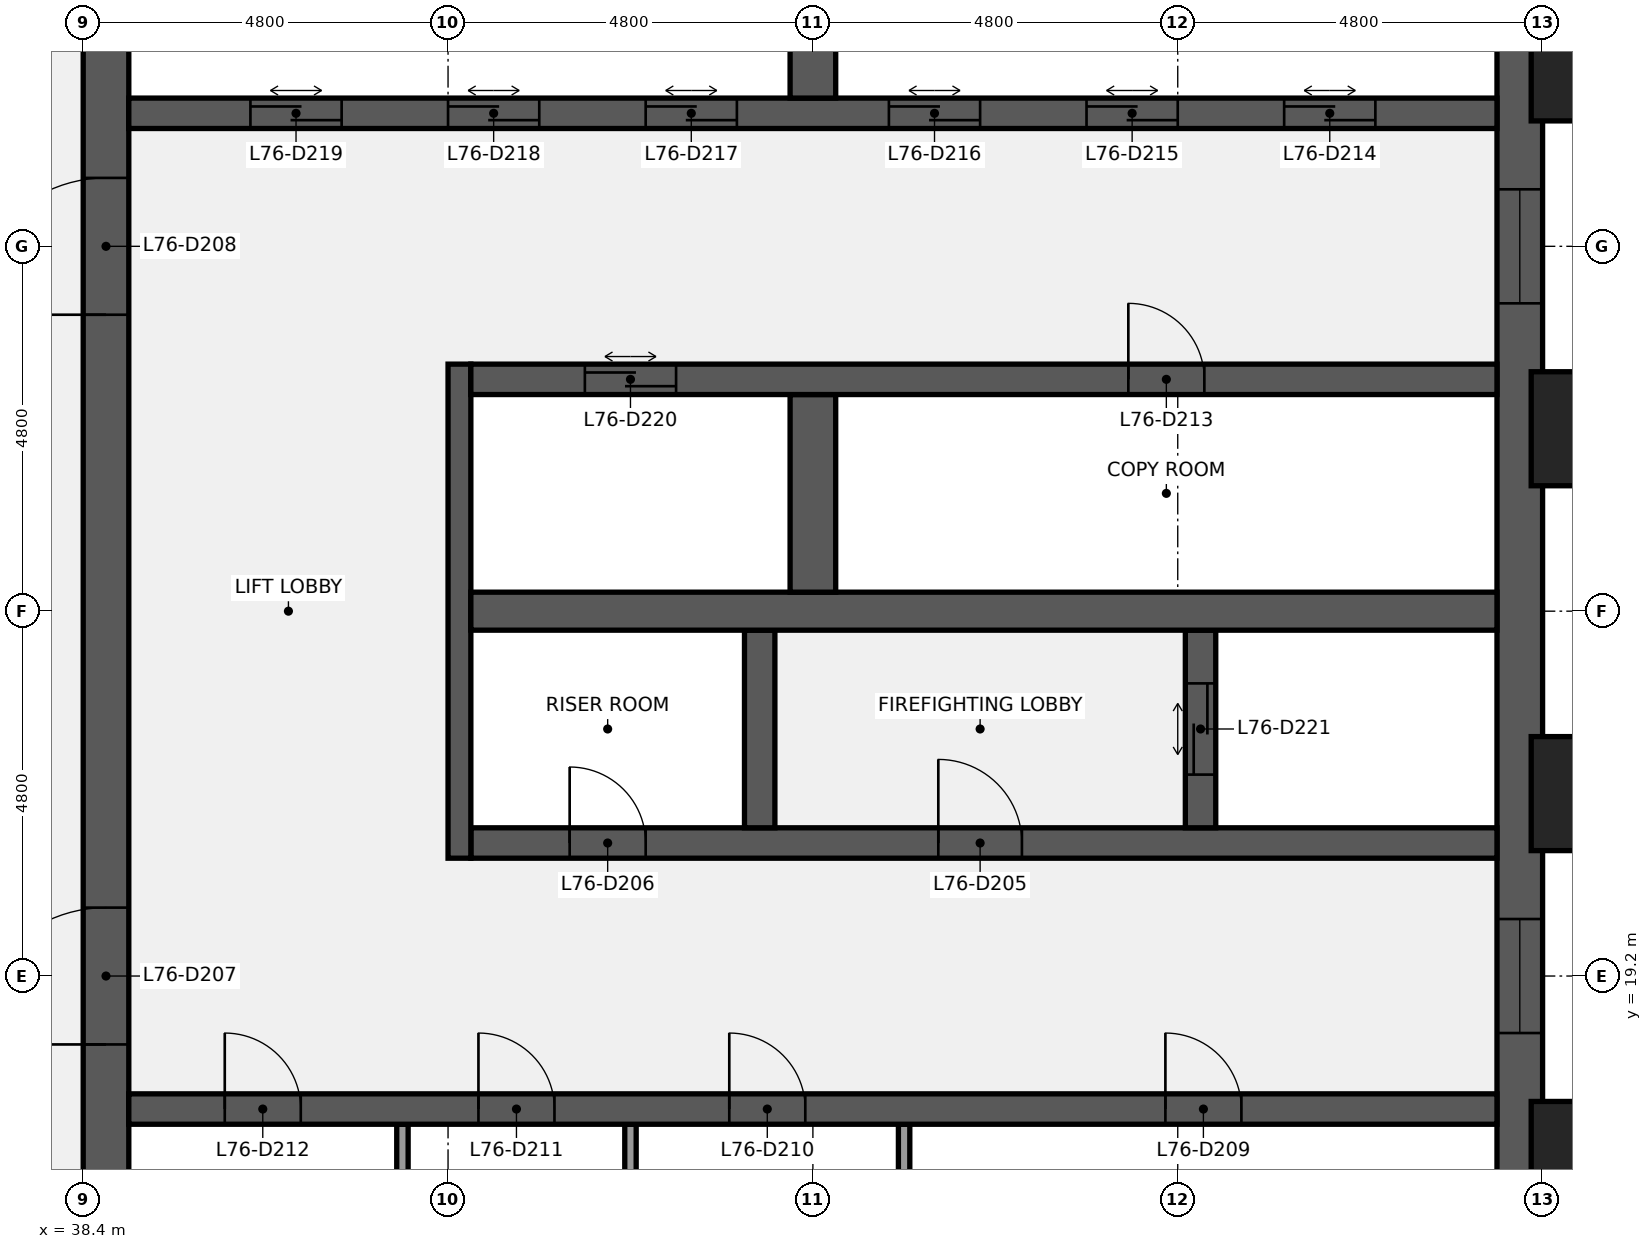
"""IFC4 building model, lengths in metres.
Left out: names, types, materials, properties, quantities, classifications, styles, units other than length and angle.
Written with IfcOpenShell. Run it as: python <this file> out.ifc"""

import sys

from ifc_helpers import new_model, si_unit, direction, frame, frame_2d, origin, origin_2d, place, context, subcontext, project, spatial, rectangle, extrude, element, fill, save


model = new_model("IFC4")
c1 = context("Model", 3, precision=1e-05, world=origin(), true_north=direction((0.0, 1.0)))
c2 = subcontext(c1, "Body", "Model", "MODEL_VIEW")
j1 = project(units=[si_unit("LENGTHUNIT", "METRE"), si_unit("PLANEANGLEUNIT", "RADIAN")], contexts=[c1])
p1 = place(None, origin())
s1 = spatial("IfcSite", under=j1, at=p1, CompositionType="ELEMENT")
p2 = place(p1, origin())
s2 = spatial("IfcBuilding", under=s1, at=p2, CompositionType="ELEMENT")
p3 = place(p2, frame((0.0, 0.0, 342.3)))
s3 = spatial("IfcBuildingStorey", under=s2, at=p3, CompositionType="ELEMENT", Elevation=342.3)
p4 = place(p3, frame((57.3, 38.4, 0.0), z_axis=(0.0, 0.0, 1.0), x_axis=(0.0, -1.0, 0.0)))
e1 = element("IfcWall", 1, at=p4, inside=s3, PredefinedType="SHEAR", context=c2, shape_type="SweptSolid", body=[
    extrude(rectangle(XDim=28.8, YDim=0.6, at=frame_2d((14.4, 0.0))), origin(), (0.0, 0.0, 1.0), 3.84),
])
p5 = place(p4, frame((18.45, 0.0, 0.9)))
e2 = element("IfcOpeningElement", 2, at=p5, cuts=e1, PredefinedType="OPENING", context=c2, shape_type="SweptSolid", body=[
    extrude(rectangle(XDim=1.5, YDim=1.5, at=frame_2d((0.75, 0.75))), frame((0.0, 0.31, 0.0), z_axis=(0.0, -1.0, 0.0), x_axis=(1.0, 0.0, 0.0)), (0.0, 0.0, 1.0), 0.62),
])
p6 = place(p4, frame((8.85, 0.0, 0.9)))
e3 = element("IfcOpeningElement", 3, at=p6, cuts=e1, PredefinedType="OPENING", context=c2, shape_type="SweptSolid", body=[
    extrude(rectangle(XDim=1.5, YDim=1.5, at=frame_2d((0.75, 0.75))), frame((0.0, 0.31, 0.0), z_axis=(0.0, -1.0, 0.0), x_axis=(1.0, 0.0, 0.0)), (0.0, 0.0, 1.0), 0.62),
])
p7 = place(p3, frame((38.7, 9.6, 0.0), z_axis=(0.0, 0.0, 1.0), x_axis=(0.0, 1.0, 0.0)))
e4 = element("IfcWall", 4, at=p7, inside=s3, PredefinedType="SHEAR", context=c2, shape_type="SweptSolid", body=[
    extrude(rectangle(XDim=28.8, YDim=0.6, at=frame_2d((14.4, 0.0))), origin(), (0.0, 0.0, 1.0), 3.84),
])
p8 = place(p7, frame((8.7, 0.0, 0.0)))
e5 = element("IfcOpeningElement", 5, at=p8, cuts=e4, PredefinedType="OPENING", context=c2, shape_type="SweptSolid", body=[
    extrude(rectangle(XDim=1.8, YDim=2.1, at=frame_2d((0.9, 1.05))), frame((0.0, 0.31, 0.0), z_axis=(0.0, -1.0, 0.0), x_axis=(1.0, 0.0, 0.0)), (0.0, 0.0, 1.0), 0.62),
])
p9 = place(p7, frame((18.3, 0.0, 0.0)))
e6 = element("IfcOpeningElement", 6, at=p9, cuts=e4, PredefinedType="OPENING", context=c2, shape_type="SweptSolid", body=[
    extrude(rectangle(XDim=1.8, YDim=2.1, at=frame_2d((0.9, 1.05))), frame((0.0, 0.31, 0.0), z_axis=(0.0, -1.0, 0.0), x_axis=(1.0, 0.0, 0.0)), (0.0, 0.0, 1.0), 0.62),
])
for number, where, z_axis, x_axis in (
    (7, (49.2, 14.65, 0.0), (0.0, 0.0, 1.0), (0.0, 1.0, 0.0)),
    (8, (45.6, 14.65, 0.0), (0.0, 0.0, 1.0), (0.0, 1.0, 0.0)),
    (9, (42.6, 14.65, 0.0), (0.0, 0.0, 1.0), (0.0, 1.0, 0.0)),
):
    element("IfcWall", number, at=place(p3, frame(where, z_axis=z_axis, x_axis=x_axis)), inside=s3, PredefinedType="PARTITIONING", context=c2, shape_type="SweptSolid", body=[
        extrude(rectangle(XDim=2.6, YDim=0.15, at=frame_2d((1.3, 0.0))), origin(), (0.0, 0.0, 1.0), 3.84),
    ])
p10 = place(p3, frame((39.0, 17.45, 0.0), z_axis=(0.0, 0.0, 1.0), x_axis=(1.0, 0.0, 0.0)))
e10 = element("IfcWall", 10, at=p10, inside=s3, PredefinedType="SHEAR", context=c2, shape_type="SweptSolid", body=[
    extrude(rectangle(XDim=18.0, YDim=0.4, at=frame_2d((9.0, 0.0))), origin(), (0.0, 0.0, 1.0), 3.84),
])
p11 = place(p10, frame((13.637, 0.0, 0.0)))
e11 = element("IfcOpeningElement", 11, at=p11, cuts=e10, PredefinedType="OPENING", context=c2, shape_type="SweptSolid", body=[
    extrude(rectangle(XDim=1.0, YDim=2.1, at=frame_2d((0.5, 1.05))), frame((0.0, 0.21, 0.0), z_axis=(0.0, -1.0, 0.0), x_axis=(1.0, 0.0, 0.0)), (0.0, 0.0, 1.0), 0.42),
])
p12 = place(p10, frame((7.9, 0.0, 0.0)))
e12 = element("IfcOpeningElement", 12, at=p12, cuts=e10, PredefinedType="OPENING", context=c2, shape_type="SweptSolid", body=[
    extrude(rectangle(XDim=1.0, YDim=2.1, at=frame_2d((0.5, 1.05))), frame((0.0, 0.21, 0.0), z_axis=(0.0, -1.0, 0.0), x_axis=(1.0, 0.0, 0.0)), (0.0, 0.0, 1.0), 0.42),
])
p13 = place(p10, frame((4.6, 0.0, 0.0)))
e13 = element("IfcOpeningElement", 13, at=p13, cuts=e10, PredefinedType="OPENING", context=c2, shape_type="SweptSolid", body=[
    extrude(rectangle(XDim=1.0, YDim=2.1, at=frame_2d((0.5, 1.05))), frame((0.0, 0.21, 0.0), z_axis=(0.0, -1.0, 0.0), x_axis=(1.0, 0.0, 0.0)), (0.0, 0.0, 1.0), 0.42),
])
p14 = place(p10, frame((1.262, 0.0, 0.0)))
e14 = element("IfcOpeningElement", 14, at=p14, cuts=e10, PredefinedType="OPENING", context=c2, shape_type="SweptSolid", body=[
    extrude(rectangle(XDim=1.0, YDim=2.1, at=frame_2d((0.5, 1.05))), frame((0.0, 0.21, 0.0), z_axis=(0.0, -1.0, 0.0), x_axis=(1.0, 0.0, 0.0)), (0.0, 0.0, 1.0), 0.42),
])
p15 = place(p3, frame((43.5, 20.95, 0.0), z_axis=(0.0, 0.0, 1.0), x_axis=(1.0, 0.0, 0.0)))
e15 = element("IfcWall", 15, at=p15, inside=s3, PredefinedType="SHEAR", context=c2, shape_type="SweptSolid", body=[
    extrude(rectangle(XDim=13.5, YDim=0.4, at=frame_2d((6.75, 0.0))), origin(), (0.0, 0.0, 1.0), 3.84),
])
p16 = place(p15, frame((6.15, 0.0, 0.0)))
e16 = element("IfcOpeningElement", 16, at=p16, cuts=e15, PredefinedType="OPENING", context=c2, shape_type="SweptSolid", body=[
    extrude(rectangle(XDim=1.1, YDim=2.1, at=frame_2d((0.55, 1.05))), frame((0.0, 0.21, 0.0), z_axis=(0.0, -1.0, 0.0), x_axis=(1.0, 0.0, 0.0)), (0.0, 0.0, 1.0), 0.42),
])
p17 = place(p15, frame((1.3, 0.0, 0.0)))
e17 = element("IfcOpeningElement", 17, at=p17, cuts=e15, PredefinedType="OPENING", context=c2, shape_type="SweptSolid", body=[
    extrude(rectangle(XDim=1.0, YDim=2.1, at=frame_2d((0.5, 1.05))), frame((0.0, 0.21, 0.0), z_axis=(0.0, -1.0, 0.0), x_axis=(1.0, 0.0, 0.0)), (0.0, 0.0, 1.0), 0.42),
])
p18 = place(p3, frame((43.35, 20.75, 0.0), z_axis=(0.0, 0.0, 1.0), x_axis=(0.0, 1.0, 0.0)))
e18 = element("IfcWall", 18, at=p18, inside=s3, PredefinedType="SHEAR", context=c2, shape_type="SweptSolid", body=[
    extrude(rectangle(XDim=6.5, YDim=0.3, at=frame_2d((3.25, 0.0))), origin(), (0.0, 0.0, 1.0), 3.84),
])
p19 = place(p3, frame((53.1, 21.15, 0.0), z_axis=(0.0, 0.0, 1.0), x_axis=(0.0, 1.0, 0.0)))
e19 = element("IfcWall", 19, at=p19, inside=s3, PredefinedType="SHEAR", context=c2, shape_type="SweptSolid", body=[
    extrude(rectangle(XDim=2.6, YDim=0.4, at=frame_2d((1.3, 0.0))), origin(), (0.0, 0.0, 1.0), 3.84),
])
p20 = place(p19, frame((0.7, 0.0, 0.0)))
e20 = element("IfcOpeningElement", 20, at=p20, cuts=e19, PredefinedType="OPENING", context=c2, shape_type="SweptSolid", body=[
    extrude(rectangle(XDim=1.2, YDim=2.1, at=frame_2d((0.6, 1.05))), frame((0.0, 0.21, 0.0), z_axis=(0.0, -1.0, 0.0), x_axis=(1.0, 0.0, 0.0)), (0.0, 0.0, 1.0), 0.42),
])
p21 = place(p3, frame((47.3, 21.15, 0.0), z_axis=(0.0, 0.0, 1.0), x_axis=(0.0, 1.0, 0.0)))
e21 = element("IfcWall", 21, at=p21, inside=s3, PredefinedType="SHEAR", context=c2, shape_type="SweptSolid", body=[
    extrude(rectangle(XDim=2.6, YDim=0.4, at=frame_2d((1.3, 0.0))), origin(), (0.0, 0.0, 1.0), 3.84),
])
p22 = place(p3, frame((43.5, 24.0, 0.0), z_axis=(0.0, 0.0, 1.0), x_axis=(1.0, 0.0, 0.0)))
e22 = element("IfcWall", 22, at=p22, inside=s3, PredefinedType="SHEAR", context=c2, shape_type="SweptSolid", body=[
    extrude(rectangle(XDim=13.5, YDim=0.5, at=frame_2d((6.75, 0.0))), origin(), (0.0, 0.0, 1.0), 3.84),
])
p23 = place(p3, frame((48.0, 24.25, 0.0), z_axis=(0.0, 0.0, 1.0), x_axis=(0.0, 1.0, 0.0)))
e23 = element("IfcWall", 23, at=p23, inside=s3, PredefinedType="SHEAR", context=c2, shape_type="SweptSolid", body=[
    extrude(rectangle(XDim=2.6, YDim=0.6, at=frame_2d((1.3, 0.0))), origin(), (0.0, 0.0, 1.0), 3.84),
])
p24 = place(p3, frame((43.5, 27.05, 0.0), z_axis=(0.0, 0.0, 1.0), x_axis=(1.0, 0.0, 0.0)))
e24 = element("IfcWall", 24, at=p24, inside=s3, PredefinedType="SHEAR", context=c2, shape_type="SweptSolid", body=[
    extrude(rectangle(XDim=13.5, YDim=0.4, at=frame_2d((6.75, 0.0))), origin(), (0.0, 0.0, 1.0), 3.84),
])
p25 = place(p24, frame((8.65, 0.0, 0.0)))
e25 = element("IfcOpeningElement", 25, at=p25, cuts=e24, PredefinedType="OPENING", context=c2, shape_type="SweptSolid", body=[
    extrude(rectangle(XDim=1.0, YDim=2.1, at=frame_2d((0.5, 1.05))), frame((0.0, 0.21, 0.0), z_axis=(0.0, -1.0, 0.0), x_axis=(1.0, 0.0, 0.0)), (0.0, 0.0, 1.0), 0.42),
])
p26 = place(p24, frame((1.5, 0.0, 0.0)))
e26 = element("IfcOpeningElement", 26, at=p26, cuts=e24, PredefinedType="OPENING", context=c2, shape_type="SweptSolid", body=[
    extrude(rectangle(XDim=1.2, YDim=2.1, at=frame_2d((0.6, 1.05))), frame((0.0, 0.21, 0.0), z_axis=(0.0, -1.0, 0.0), x_axis=(1.0, 0.0, 0.0)), (0.0, 0.0, 1.0), 0.42),
])
p27 = place(p3, frame((39.0, 30.55, 0.0), z_axis=(0.0, 0.0, 1.0), x_axis=(1.0, 0.0, 0.0)))
e27 = element("IfcWall", 27, at=p27, inside=s3, PredefinedType="SHEAR", context=c2, shape_type="SweptSolid", body=[
    extrude(rectangle(XDim=18.0, YDim=0.4, at=frame_2d((9.0, 0.0))), origin(), (0.0, 0.0, 1.0), 3.84),
])
p28 = place(p27, frame((15.2, 0.0, 0.0)))
e28 = element("IfcOpeningElement", 28, at=p28, cuts=e27, PredefinedType="OPENING", context=c2, shape_type="SweptSolid", body=[
    extrude(rectangle(XDim=1.2, YDim=2.1, at=frame_2d((0.6, 1.05))), frame((0.0, 0.21, 0.0), z_axis=(0.0, -1.0, 0.0), x_axis=(1.0, 0.0, 0.0)), (0.0, 0.0, 1.0), 0.42),
])
p29 = place(p27, frame((12.6, 0.0, 0.0)))
e29 = element("IfcOpeningElement", 29, at=p29, cuts=e27, PredefinedType="OPENING", context=c2, shape_type="SweptSolid", body=[
    extrude(rectangle(XDim=1.2, YDim=2.1, at=frame_2d((0.6, 1.05))), frame((0.0, 0.21, 0.0), z_axis=(0.0, -1.0, 0.0), x_axis=(1.0, 0.0, 0.0)), (0.0, 0.0, 1.0), 0.42),
])
p30 = place(p27, frame((10.0, 0.0, 0.0)))
e30 = element("IfcOpeningElement", 30, at=p30, cuts=e27, PredefinedType="OPENING", context=c2, shape_type="SweptSolid", body=[
    extrude(rectangle(XDim=1.2, YDim=2.1, at=frame_2d((0.6, 1.05))), frame((0.0, 0.21, 0.0), z_axis=(0.0, -1.0, 0.0), x_axis=(1.0, 0.0, 0.0)), (0.0, 0.0, 1.0), 0.42),
])
p31 = place(p27, frame((6.8, 0.0, 0.0)))
e31 = element("IfcOpeningElement", 31, at=p31, cuts=e27, PredefinedType="OPENING", context=c2, shape_type="SweptSolid", body=[
    extrude(rectangle(XDim=1.2, YDim=2.1, at=frame_2d((0.6, 1.05))), frame((0.0, 0.21, 0.0), z_axis=(0.0, -1.0, 0.0), x_axis=(1.0, 0.0, 0.0)), (0.0, 0.0, 1.0), 0.42),
])
p32 = place(p27, frame((4.2, 0.0, 0.0)))
e32 = element("IfcOpeningElement", 32, at=p32, cuts=e27, PredefinedType="OPENING", context=c2, shape_type="SweptSolid", body=[
    extrude(rectangle(XDim=1.2, YDim=2.1, at=frame_2d((0.6, 1.05))), frame((0.0, 0.21, 0.0), z_axis=(0.0, -1.0, 0.0), x_axis=(1.0, 0.0, 0.0)), (0.0, 0.0, 1.0), 0.42),
])
p33 = place(p27, frame((1.6, 0.0, 0.0)))
e33 = element("IfcOpeningElement", 33, at=p33, cuts=e27, PredefinedType="OPENING", context=c2, shape_type="SweptSolid", body=[
    extrude(rectangle(XDim=1.2, YDim=2.1, at=frame_2d((0.6, 1.05))), frame((0.0, 0.21, 0.0), z_axis=(0.0, -1.0, 0.0), x_axis=(1.0, 0.0, 0.0)), (0.0, 0.0, 1.0), 0.42),
])
p34 = place(p3, frame((48.0, 30.75, 0.0), z_axis=(0.0, 0.0, 1.0), x_axis=(0.0, 1.0, 0.0)))
e34 = element("IfcWall", 34, at=p34, inside=s3, PredefinedType="SHEAR", context=c2, shape_type="SweptSolid", body=[
    extrude(rectangle(XDim=2.6, YDim=0.6, at=frame_2d((1.3, 0.0))), origin(), (0.0, 0.0, 1.0), 3.84),
])
for number, where, z_axis, x_axis in (
    (35, (58.35, 16.8, 0.0), (0.0, 0.0, 1.0), (0.0, 1.0, 0.0)),
    (36, (58.35, 21.6, 0.0), (0.0, 0.0, 1.0), (0.0, 1.0, 0.0)),
    (37, (58.35, 26.4, 0.0), (0.0, 0.0, 1.0), (0.0, 1.0, 0.0)),
    (38, (58.35, 31.2, 0.0), (0.0, 0.0, 1.0), (0.0, 1.0, 0.0)),
):
    element("IfcColumn", number, at=place(p3, frame(where, z_axis=z_axis, x_axis=x_axis)), inside=s3, PredefinedType="PILASTER", context=c2, shape_type="SweptSolid", body=[
        extrude(rectangle(XDim=1.8, YDim=1.5, at=origin_2d()), origin(), (0.0, 0.0, 1.0), 4.0),
    ])
p35 = place(p16, origin())
e39 = element("IfcDoor", 39, at=p35, inside=s3, OperationType="SINGLE_SWING_LEFT", PredefinedType="DOOR", context=c2, shape_type="SweptSolid", body=[
    extrude(rectangle(XDim=1.1, YDim=2.1, at=frame_2d((0.55, 1.05))), frame((0.0, 0.025, 0.0), z_axis=(0.0, -1.0, 0.0), x_axis=(1.0, 0.0, 0.0)), (0.0, 0.0, 1.0), 0.05),
])
fill(e16, e39)
p36 = place(p17, origin())
e40 = element("IfcDoor", 40, at=p36, inside=s3, OperationType="SINGLE_SWING_LEFT", PredefinedType="DOOR", context=c2, shape_type="SweptSolid", body=[
    extrude(rectangle(XDim=1.0, YDim=2.1, at=frame_2d((0.5, 1.05))), frame((0.0, 0.025, 0.0), z_axis=(0.0, -1.0, 0.0), x_axis=(1.0, 0.0, 0.0)), (0.0, 0.0, 1.0), 0.05),
])
fill(e17, e40)
p37 = place(p8, origin())
e41 = element("IfcDoor", 41, at=p37, inside=s3, OperationType="DOUBLE_DOOR_SINGLE_SWING", PredefinedType="DOOR", context=c2, shape_type="SweptSolid", body=[
    extrude(rectangle(XDim=1.8, YDim=2.1, at=frame_2d((0.9, 1.05))), frame((0.0, 0.025, 0.0), z_axis=(0.0, -1.0, 0.0), x_axis=(1.0, 0.0, 0.0)), (0.0, 0.0, 1.0), 0.05),
])
fill(e5, e41)
p38 = place(p9, origin())
e42 = element("IfcDoor", 42, at=p38, inside=s3, OperationType="DOUBLE_DOOR_SINGLE_SWING", PredefinedType="DOOR", context=c2, shape_type="SweptSolid", body=[
    extrude(rectangle(XDim=1.8, YDim=2.1, at=frame_2d((0.9, 1.05))), frame((0.0, 0.025, 0.0), z_axis=(0.0, -1.0, 0.0), x_axis=(1.0, 0.0, 0.0)), (0.0, 0.0, 1.0), 0.05),
])
fill(e6, e42)
p39 = place(p11, origin())
e43 = element("IfcDoor", 43, at=p39, inside=s3, OperationType="SINGLE_SWING_LEFT", PredefinedType="DOOR", context=c2, shape_type="SweptSolid", body=[
    extrude(rectangle(XDim=1.0, YDim=2.1, at=frame_2d((0.5, 1.05))), frame((0.0, 0.025, 0.0), z_axis=(0.0, -1.0, 0.0), x_axis=(1.0, 0.0, 0.0)), (0.0, 0.0, 1.0), 0.05),
])
fill(e11, e43)
p40 = place(p12, origin())
e44 = element("IfcDoor", 44, at=p40, inside=s3, OperationType="SINGLE_SWING_LEFT", PredefinedType="DOOR", context=c2, shape_type="SweptSolid", body=[
    extrude(rectangle(XDim=1.0, YDim=2.1, at=frame_2d((0.5, 1.05))), frame((0.0, 0.025, 0.0), z_axis=(0.0, -1.0, 0.0), x_axis=(1.0, 0.0, 0.0)), (0.0, 0.0, 1.0), 0.05),
])
fill(e12, e44)
p41 = place(p13, origin())
e45 = element("IfcDoor", 45, at=p41, inside=s3, OperationType="SINGLE_SWING_LEFT", PredefinedType="DOOR", context=c2, shape_type="SweptSolid", body=[
    extrude(rectangle(XDim=1.0, YDim=2.1, at=frame_2d((0.5, 1.05))), frame((0.0, 0.025, 0.0), z_axis=(0.0, -1.0, 0.0), x_axis=(1.0, 0.0, 0.0)), (0.0, 0.0, 1.0), 0.05),
])
fill(e13, e45)
p42 = place(p14, origin())
e46 = element("IfcDoor", 46, at=p42, inside=s3, OperationType="SINGLE_SWING_LEFT", PredefinedType="DOOR", context=c2, shape_type="SweptSolid", body=[
    extrude(rectangle(XDim=1.0, YDim=2.1, at=frame_2d((0.5, 1.05))), frame((0.0, 0.025, 0.0), z_axis=(0.0, -1.0, 0.0), x_axis=(1.0, 0.0, 0.0)), (0.0, 0.0, 1.0), 0.05),
])
fill(e14, e46)
p43 = place(p25, origin())
e47 = element("IfcDoor", 47, at=p43, inside=s3, OperationType="SINGLE_SWING_LEFT", PredefinedType="DOOR", context=c2, shape_type="SweptSolid", body=[
    extrude(rectangle(XDim=1.0, YDim=2.1, at=frame_2d((0.5, 1.05))), frame((0.0, 0.025, 0.0), z_axis=(0.0, -1.0, 0.0), x_axis=(1.0, 0.0, 0.0)), (0.0, 0.0, 1.0), 0.05),
])
fill(e25, e47)
p44 = place(p28, origin())
e48 = element("IfcDoor", 48, at=p44, inside=s3, OperationType="DOUBLE_DOOR_SLIDING", PredefinedType="DOOR", context=c2, shape_type="SweptSolid", body=[
    extrude(rectangle(XDim=1.2, YDim=2.1, at=frame_2d((0.6, 1.05))), frame((0.0, 0.025, 0.0), z_axis=(0.0, -1.0, 0.0), x_axis=(1.0, 0.0, 0.0)), (0.0, 0.0, 1.0), 0.05),
])
fill(e28, e48)
p45 = place(p29, origin())
e49 = element("IfcDoor", 49, at=p45, inside=s3, OperationType="DOUBLE_DOOR_SLIDING", PredefinedType="DOOR", context=c2, shape_type="SweptSolid", body=[
    extrude(rectangle(XDim=1.2, YDim=2.1, at=frame_2d((0.6, 1.05))), frame((0.0, 0.025, 0.0), z_axis=(0.0, -1.0, 0.0), x_axis=(1.0, 0.0, 0.0)), (0.0, 0.0, 1.0), 0.05),
])
fill(e29, e49)
p46 = place(p30, origin())
e50 = element("IfcDoor", 50, at=p46, inside=s3, OperationType="DOUBLE_DOOR_SLIDING", PredefinedType="DOOR", context=c2, shape_type="SweptSolid", body=[
    extrude(rectangle(XDim=1.2, YDim=2.1, at=frame_2d((0.6, 1.05))), frame((0.0, 0.025, 0.0), z_axis=(0.0, -1.0, 0.0), x_axis=(1.0, 0.0, 0.0)), (0.0, 0.0, 1.0), 0.05),
])
fill(e30, e50)
p47 = place(p31, origin())
e51 = element("IfcDoor", 51, at=p47, inside=s3, OperationType="DOUBLE_DOOR_SLIDING", PredefinedType="DOOR", context=c2, shape_type="SweptSolid", body=[
    extrude(rectangle(XDim=1.2, YDim=2.1, at=frame_2d((0.6, 1.05))), frame((0.0, 0.025, 0.0), z_axis=(0.0, -1.0, 0.0), x_axis=(1.0, 0.0, 0.0)), (0.0, 0.0, 1.0), 0.05),
])
fill(e31, e51)
p48 = place(p32, origin())
e52 = element("IfcDoor", 52, at=p48, inside=s3, OperationType="DOUBLE_DOOR_SLIDING", PredefinedType="DOOR", context=c2, shape_type="SweptSolid", body=[
    extrude(rectangle(XDim=1.2, YDim=2.1, at=frame_2d((0.6, 1.05))), frame((0.0, 0.025, 0.0), z_axis=(0.0, -1.0, 0.0), x_axis=(1.0, 0.0, 0.0)), (0.0, 0.0, 1.0), 0.05),
])
fill(e32, e52)
p49 = place(p33, origin())
e53 = element("IfcDoor", 53, at=p49, inside=s3, OperationType="DOUBLE_DOOR_SLIDING", PredefinedType="DOOR", context=c2, shape_type="SweptSolid", body=[
    extrude(rectangle(XDim=1.2, YDim=2.1, at=frame_2d((0.6, 1.05))), frame((0.0, 0.025, 0.0), z_axis=(0.0, -1.0, 0.0), x_axis=(1.0, 0.0, 0.0)), (0.0, 0.0, 1.0), 0.05),
])
fill(e33, e53)
p50 = place(p26, origin())
e54 = element("IfcDoor", 54, at=p50, inside=s3, OperationType="DOUBLE_DOOR_SLIDING", PredefinedType="DOOR", context=c2, shape_type="SweptSolid", body=[
    extrude(rectangle(XDim=1.2, YDim=2.1, at=frame_2d((0.6, 1.05))), frame((0.0, 0.025, 0.0), z_axis=(0.0, -1.0, 0.0), x_axis=(1.0, 0.0, 0.0)), (0.0, 0.0, 1.0), 0.05),
])
fill(e26, e54)
p51 = place(p20, origin())
e55 = element("IfcDoor", 55, at=p51, inside=s3, OperationType="DOUBLE_DOOR_SLIDING", PredefinedType="DOOR", context=c2, shape_type="SweptSolid", body=[
    extrude(rectangle(XDim=1.2, YDim=2.1, at=frame_2d((0.6, 1.05))), frame((0.0, 0.025, 0.0), z_axis=(0.0, -1.0, 0.0), x_axis=(1.0, 0.0, 0.0)), (0.0, 0.0, 1.0), 0.05),
])
fill(e20, e55)
p52 = place(p5, origin())
e56 = element("IfcWindow", 56, at=p52, inside=s3, PartitioningType="SINGLE_PANEL", PredefinedType="WINDOW", context=c2, shape_type="SweptSolid", body=[
    extrude(rectangle(XDim=1.5, YDim=1.5, at=frame_2d((0.75, 0.75))), frame((0.0, 0.03, 0.0), z_axis=(0.0, -1.0, 0.0), x_axis=(1.0, 0.0, 0.0)), (0.0, 0.0, 1.0), 0.06),
])
fill(e2, e56)
p53 = place(p6, origin())
e57 = element("IfcWindow", 57, at=p53, inside=s3, PartitioningType="SINGLE_PANEL", PredefinedType="WINDOW", context=c2, shape_type="SweptSolid", body=[
    extrude(rectangle(XDim=1.5, YDim=1.5, at=frame_2d((0.75, 0.75))), frame((0.0, 0.03, 0.0), z_axis=(0.0, -1.0, 0.0), x_axis=(1.0, 0.0, 0.0)), (0.0, 0.0, 1.0), 0.06),
])
fill(e3, e57)
save(model, sys.argv[1])
